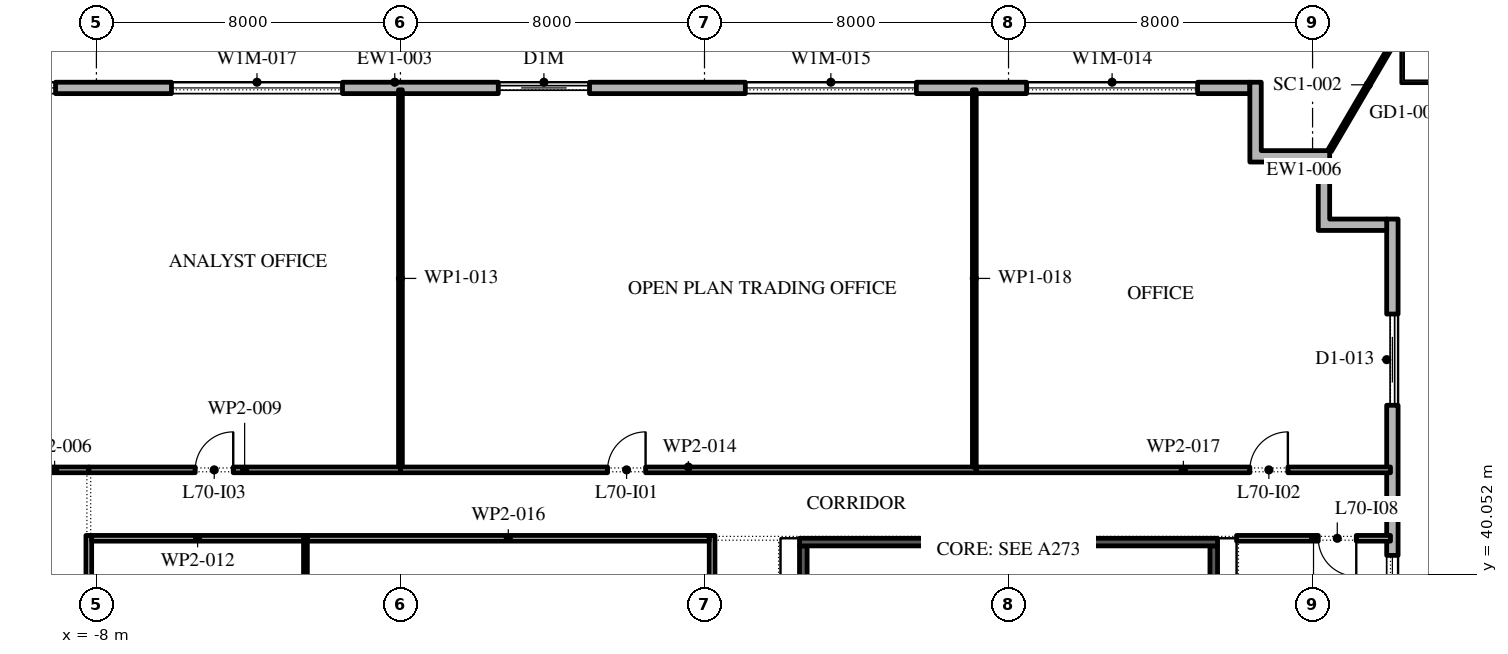
"""IFC4 building model, lengths in metres.
Left out: names, types, materials, properties, quantities, classifications, styles, units other than length and angle.
Written with IfcOpenShell. Run it as: python <this file> out.ifc"""

import sys

from ifc_helpers import new_model, si_unit, direction, frame, frame_2d, origin, place, context, subcontext, project, spatial, polyline, rectangle, outline, extrude, element, fill, save


model = new_model("IFC4")
c1 = context("Model", 3, precision=1e-05, world=origin(), true_north=direction((0.0, 1.0)))
c2 = subcontext(c1, "Body", "Model", "MODEL_VIEW")
j1 = project(units=[si_unit("LENGTHUNIT", "METRE"), si_unit("PLANEANGLEUNIT", "RADIAN")], contexts=[c1])
p1 = place(None, origin())
s1 = spatial("IfcSite", under=j1, at=p1, CompositionType="ELEMENT")
p2 = place(p1, origin())
s2 = spatial("IfcBuilding", under=s1, at=p2, CompositionType="ELEMENT")
p3 = place(p2, frame((0.0, 0.0, 321.6)))
s3 = spatial("IfcBuildingStorey", under=s2, at=p3, CompositionType="ELEMENT", Elevation=321.6)
p4 = place(p3, frame((26.1, -2.1, 0.0), z_axis=(0.0, 0.0, 1.0), x_axis=(0.0, 1.0, 0.0)))
e1 = element("IfcWall", 1, at=p4, inside=s3, PredefinedType="STANDARD", context=c2, shape_type="SweptSolid", body=[
    extrude(rectangle(XDim=51.5, YDim=0.3, at=frame_2d((25.75, 0.0))), origin(), (0.0, 0.0, 1.0), 4.0),
])
p5 = place(p4, frame((1.3, 0.0, 0.45)))
e2 = element("IfcOpeningElement", 2, at=p5, cuts=e1, PredefinedType="OPENING", context=c2, shape_type="SweptSolid", body=[
    extrude(rectangle(XDim=4.5, YDim=3.05, at=frame_2d((2.25, 1.525))), frame((0.0, 0.16, 0.0), z_axis=(0.0, -1.0, 0.0), x_axis=(1.0, 0.0, 0.0)), (0.0, 0.0, 1.0), 0.32),
])
p6 = place(p4, frame((8.55, 0.0, 0.45)))
e3 = element("IfcOpeningElement", 3, at=p6, cuts=e1, PredefinedType="OPENING", context=c2, shape_type="SweptSolid", body=[
    extrude(rectangle(XDim=4.5, YDim=3.05, at=frame_2d((2.25, 1.525))), frame((0.0, 0.16, 0.0), z_axis=(0.0, -1.0, 0.0), x_axis=(1.0, 0.0, 0.0)), (0.0, 0.0, 1.0), 0.32),
])
p7 = place(p4, frame((17.0, 0.0, 0.0)))
e4 = element("IfcOpeningElement", 4, at=p7, cuts=e1, PredefinedType="OPENING", context=c2, shape_type="SweptSolid", body=[
    extrude(rectangle(XDim=2.4, YDim=3.5, at=frame_2d((1.2, 1.75))), frame((0.0, 0.16, 0.0), z_axis=(0.0, -1.0, 0.0), x_axis=(1.0, 0.0, 0.0)), (0.0, 0.0, 1.0), 0.32),
])
p8 = place(p4, frame((23.35, 0.0, 0.45)))
e5 = element("IfcOpeningElement", 5, at=p8, cuts=e1, PredefinedType="OPENING", context=c2, shape_type="SweptSolid", body=[
    extrude(rectangle(XDim=4.5, YDim=3.05, at=frame_2d((2.25, 1.525))), frame((0.0, 0.16, 0.0), z_axis=(0.0, -1.0, 0.0), x_axis=(1.0, 0.0, 0.0)), (0.0, 0.0, 1.0), 0.32),
])
p9 = place(p4, frame((30.75, 0.0, 0.45)))
e6 = element("IfcOpeningElement", 6, at=p9, cuts=e1, PredefinedType="OPENING", context=c2, shape_type="SweptSolid", body=[
    extrude(rectangle(XDim=4.5, YDim=3.05, at=frame_2d((2.25, 1.525))), frame((0.0, 0.16, 0.0), z_axis=(0.0, -1.0, 0.0), x_axis=(1.0, 0.0, 0.0)), (0.0, 0.0, 1.0), 0.32),
])
p10 = place(p4, frame((38.15, 0.0, 0.45)))
e7 = element("IfcOpeningElement", 7, at=p10, cuts=e1, PredefinedType="OPENING", context=c2, shape_type="SweptSolid", body=[
    extrude(rectangle(XDim=4.5, YDim=3.05, at=frame_2d((2.25, 1.525))), frame((0.0, 0.16, 0.0), z_axis=(0.0, -1.0, 0.0), x_axis=(1.0, 0.0, 0.0)), (0.0, 0.0, 1.0), 0.32),
])
p11 = place(p4, frame((46.6, 0.0, 0.0)))
e8 = element("IfcOpeningElement", 8, at=p11, cuts=e1, PredefinedType="OPENING", context=c2, shape_type="SweptSolid", body=[
    extrude(rectangle(XDim=2.4, YDim=3.5, at=frame_2d((1.2, 1.75))), frame((0.0, 0.16, 0.0), z_axis=(0.0, -1.0, 0.0), x_axis=(1.0, 0.0, 0.0)), (0.0, 0.0, 1.0), 0.32),
])
p12 = place(p3, frame((22.35, 52.85, 0.0), z_axis=(0.0, 0.0, 1.0), x_axis=(-1.0, 0.0, 0.0)))
e9 = element("IfcWall", 9, at=p12, inside=s3, PredefinedType="STANDARD", context=c2, shape_type="SweptSolid", body=[
    extrude(rectangle(XDim=45.0, YDim=0.3, at=frame_2d((22.5, 0.0))), origin(), (0.0, 0.0, 1.0), 4.0),
])
p13 = place(p12, frame((1.375, 0.0, 0.45)))
e10 = element("IfcOpeningElement", 10, at=p13, cuts=e9, PredefinedType="OPENING", context=c2, shape_type="SweptSolid", body=[
    extrude(rectangle(XDim=4.5, YDim=2.575, at=frame_2d((2.25, 1.288))), frame((0.0, 0.16, 0.0), z_axis=(0.0, -1.0, 0.0), x_axis=(1.0, 0.0, 0.0)), (0.0, 0.0, 1.0), 0.32),
])
p14 = place(p12, frame((8.775, 0.0, 0.45)))
e11 = element("IfcOpeningElement", 11, at=p14, cuts=e9, PredefinedType="OPENING", context=c2, shape_type="SweptSolid", body=[
    extrude(rectangle(XDim=4.5, YDim=2.575, at=frame_2d((2.25, 1.288))), frame((0.0, 0.16, 0.0), z_axis=(0.0, -1.0, 0.0), x_axis=(1.0, 0.0, 0.0)), (0.0, 0.0, 1.0), 0.32),
])
p15 = place(p12, frame((17.375, 0.0, 0.0)))
e12 = element("IfcOpeningElement", 12, at=p15, cuts=e9, PredefinedType="OPENING", context=c2, shape_type="SweptSolid", body=[
    extrude(rectangle(XDim=2.4, YDim=3.025, at=frame_2d((1.2, 1.512))), frame((0.0, 0.16, 0.0), z_axis=(0.0, -1.0, 0.0), x_axis=(1.0, 0.0, 0.0)), (0.0, 0.0, 1.0), 0.32),
])
p16 = place(p12, frame((23.875, 0.0, 0.45)))
e13 = element("IfcOpeningElement", 13, at=p16, cuts=e9, PredefinedType="OPENING", context=c2, shape_type="SweptSolid", body=[
    extrude(rectangle(XDim=4.5, YDim=2.575, at=frame_2d((2.25, 1.288))), frame((0.0, 0.16, 0.0), z_axis=(0.0, -1.0, 0.0), x_axis=(1.0, 0.0, 0.0)), (0.0, 0.0, 1.0), 0.32),
])
p17 = place(p12, frame((31.425, 0.0, 0.45)))
e14 = element("IfcOpeningElement", 14, at=p17, cuts=e9, PredefinedType="OPENING", context=c2, shape_type="SweptSolid", body=[
    extrude(rectangle(XDim=4.5, YDim=2.575, at=frame_2d((2.25, 1.288))), frame((0.0, 0.16, 0.0), z_axis=(0.0, -1.0, 0.0), x_axis=(1.0, 0.0, 0.0)), (0.0, 0.0, 1.0), 0.32),
])
p18 = place(p12, frame((38.975, 0.0, 0.45)))
e15 = element("IfcOpeningElement", 15, at=p18, cuts=e9, PredefinedType="OPENING", context=c2, shape_type="SweptSolid", body=[
    extrude(rectangle(XDim=4.5, YDim=2.575, at=frame_2d((2.25, 1.288))), frame((0.0, 0.16, 0.0), z_axis=(0.0, -1.0, 0.0), x_axis=(1.0, 0.0, 0.0)), (0.0, 0.0, 1.0), 0.32),
])
p19 = place(p3, origin())
e16 = element("IfcWall", 16, at=p19, inside=s3, PredefinedType="STANDARD", context=c2, shape_type="SweptSolid", body=[
    extrude(outline(polyline([(24.15, 50.9), (22.35, 50.9), (22.35, 53.0), (22.65, 53.0), (22.65, 51.2), (24.45, 51.2), (24.45, 49.4), (25.95, 49.4), (25.95, 49.1), (24.15, 49.1), (24.15, 50.9)])), origin(), (0.0, 0.0, 1.0), 4.0),
])
p20 = place(p3, frame((24.45, 51.2, -0.05), z_axis=(0.0, 0.0, 1.0), x_axis=(0.506031495682, 0.862515000089, 0.0)))
e17 = element("IfcWall", 17, at=p20, inside=s3, PredefinedType="STANDARD", context=c2, shape_type="SweptSolid", body=[
    extrude(rectangle(XDim=4.016, YDim=0.1, at=frame_2d((2.008, 0.0))), origin(), (0.0, 0.0, 1.0), 4.05),
])
p21 = place(p3, frame((21.4, 25.75, 0.0), z_axis=(0.0, 0.0, 1.0), x_axis=(0.0, 1.0, 0.0)))
e18 = element("IfcWall", 18, at=p21, inside=s3, PredefinedType="SHEAR", context=c2, shape_type="SweptSolid", body=[
    extrude(rectangle(XDim=15.05, YDim=0.2, at=frame_2d((7.525, 0.0))), origin(), (0.0, 0.0, 1.0), 4.0),
])
p22 = place(p3, frame((10.6, 25.75, 0.0), z_axis=(0.0, 0.0, 1.0), x_axis=(0.0, 1.0, 0.0)))
e19 = element("IfcWall", 19, at=p22, inside=s3, PredefinedType="SHEAR", context=c2, shape_type="SweptSolid", body=[
    extrude(rectangle(XDim=15.05, YDim=0.2, at=frame_2d((7.525, 0.0))), origin(), (0.0, 0.0, 1.0), 4.0),
])
p23 = place(p22, frame((7.075, 0.0, 0.0)))
e20 = element("IfcOpeningElement", 20, at=p23, cuts=e19, PredefinedType="OPENING", context=c2, shape_type="SweptSolid", body=[
    extrude(rectangle(XDim=0.9, YDim=2.1, at=frame_2d((0.45, 1.05))), frame((0.0, 0.11, 0.0), z_axis=(0.0, -1.0, 0.0), x_axis=(1.0, 0.0, 0.0)), (0.0, 0.0, 1.0), 0.22),
])
p24 = place(p3, frame((10.5, 40.9, 0.0), z_axis=(0.0, 0.0, 1.0), x_axis=(1.0, 0.0, 0.0)))
e21 = element("IfcWall", 21, at=p24, inside=s3, PredefinedType="SHEAR", context=c2, shape_type="SweptSolid", body=[
    extrude(rectangle(XDim=11.0, YDim=0.2, at=frame_2d((5.5, 0.0))), origin(), (0.0, 0.0, 1.0), 4.0),
])
p25 = place(p3, frame((-10.0, 42.8, 0.0), z_axis=(0.0, 0.0, 1.0), x_axis=(1.0, 0.0, 0.0)))
e22 = element("IfcWall", 22, at=p25, inside=s3, PredefinedType="PARTITIONING", context=c2, shape_type="SweptSolid", body=[
    extrude(rectangle(XDim=1.8, YDim=0.15, at=frame_2d((0.9, 0.0))), origin(), (0.0, 0.0, 1.0), 4.0),
])
p26 = place(p3, frame((-8.2, 41.075, 0.0), z_axis=(0.0, 0.0, 1.0), x_axis=(0.0, -1.0, 0.0)))
e23 = element("IfcWall", 23, at=p26, inside=s3, PredefinedType="PARTITIONING", context=c2, shape_type="SweptSolid", body=[
    extrude(rectangle(XDim=22.0, YDim=0.15, at=frame_2d((11.0, 0.0))), origin(), (0.0, 0.0, 1.0), 4.0),
])
p27 = place(p26, frame((10.675, 0.0, 0.0)))
e24 = element("IfcOpeningElement", 24, at=p27, cuts=e23, PredefinedType="OPENING", context=c2, shape_type="SweptSolid", body=[
    extrude(rectangle(XDim=1.0, YDim=2.1, at=frame_2d((0.5, 1.05))), frame((0.0, 0.085, 0.0), z_axis=(0.0, -1.0, 0.0), x_axis=(1.0, 0.0, 0.0)), (0.0, 0.0, 1.0), 0.17),
])
p28 = place(p3, frame((-8.2, 42.8, 0.0), z_axis=(0.0, 0.0, 1.0), x_axis=(1.0, 0.0, 0.0)))
e25 = element("IfcWall", 25, at=p28, inside=s3, PredefinedType="PARTITIONING", context=c2, shape_type="SweptSolid", body=[
    extrude(rectangle(XDim=8.2, YDim=0.15, at=frame_2d((4.1, 0.0))), origin(), (0.0, 0.0, 1.0), 4.0),
])
p29 = place(p28, frame((2.8, 0.0, 0.0)))
e26 = element("IfcOpeningElement", 26, at=p29, cuts=e25, PredefinedType="OPENING", context=c2, shape_type="SweptSolid", body=[
    extrude(rectangle(XDim=1.0, YDim=2.1, at=frame_2d((0.5, 1.05))), frame((0.0, 0.085, 0.0), z_axis=(0.0, -1.0, 0.0), x_axis=(1.0, 0.0, 0.0)), (0.0, 0.0, 1.0), 0.17),
])
p30 = place(p3, frame((-2.5, 19.075, 0.0), z_axis=(0.0, 0.0, 1.0), x_axis=(0.0, 1.0, 0.0)))
e27 = element("IfcWall", 27, at=p30, inside=s3, PredefinedType="PARTITIONING", context=c2, shape_type="SweptSolid", body=[
    extrude(rectangle(XDim=22.0, YDim=0.1, at=frame_2d((11.0, 0.0))), origin(), (0.0, 0.0, 1.0), 4.0),
])
p31 = place(p3, frame((-2.55, 41.0, 0.0), z_axis=(0.0, 0.0, 1.0), x_axis=(-1.0, 0.0, 0.0)))
e28 = element("IfcWall", 28, at=p31, inside=s3, PredefinedType="PARTITIONING", context=c2, shape_type="SweptSolid", body=[
    extrude(rectangle(XDim=5.575, YDim=0.15, at=frame_2d((2.788, 0.0))), origin(), (0.0, 0.0, 1.0), 4.0),
])
p32 = place(p3, frame((0.0, 42.875, 0.0), z_axis=(0.0, 0.0, 1.0), x_axis=(0.0, 1.0, 0.0)))
e29 = element("IfcWall", 29, at=p32, inside=s3, PredefinedType="PARTITIONING", context=c2, shape_type="SweptSolid", body=[
    extrude(rectangle(XDim=9.925, YDim=0.1, at=frame_2d((4.962, 0.0))), origin(), (0.0, 0.0, 1.0), 4.0),
])
p33 = place(p3, frame((0.0, 42.8, 0.0), z_axis=(0.0, 0.0, 1.0), x_axis=(1.0, 0.0, 0.0)))
e30 = element("IfcWall", 30, at=p33, inside=s3, PredefinedType="PARTITIONING", context=c2, shape_type="SweptSolid", body=[
    extrude(rectangle(XDim=15.15, YDim=0.15, at=frame_2d((7.575, 0.0))), origin(), (0.0, 0.0, 1.0), 4.0),
])
p34 = place(p33, frame((5.45, 0.0, 0.0)))
e31 = element("IfcOpeningElement", 31, at=p34, cuts=e30, PredefinedType="OPENING", context=c2, shape_type="SweptSolid", body=[
    extrude(rectangle(XDim=1.0, YDim=2.1, at=frame_2d((0.5, 1.05))), frame((0.0, 0.085, 0.0), z_axis=(0.0, -1.0, 0.0), x_axis=(1.0, 0.0, 0.0)), (0.0, 0.0, 1.0), 0.17),
])
p35 = place(p3, frame((8.2, 19.075, 0.0), z_axis=(0.0, 0.0, 1.0), x_axis=(0.0, 1.0, 0.0)))
e32 = element("IfcWall", 32, at=p35, inside=s3, PredefinedType="PARTITIONING", context=c2, shape_type="SweptSolid", body=[
    extrude(rectangle(XDim=22.0, YDim=0.15, at=frame_2d((11.0, 0.0))), origin(), (0.0, 0.0, 1.0), 4.0),
])
p36 = place(p35, frame((7.725, 0.0, 0.0)))
e33 = element("IfcOpeningElement", 33, at=p36, cuts=e32, PredefinedType="OPENING", context=c2, shape_type="SweptSolid", body=[
    extrude(rectangle(XDim=1.8, YDim=2.1, at=frame_2d((0.9, 1.05))), frame((0.0, 0.085, 0.0), z_axis=(0.0, -1.0, 0.0), x_axis=(1.0, 0.0, 0.0)), (0.0, 0.0, 1.0), 0.17),
])
p37 = place(p3, frame((8.125, 41.0, 0.0), z_axis=(0.0, 0.0, 1.0), x_axis=(-1.0, 0.0, 0.0)))
e34 = element("IfcWall", 34, at=p37, inside=s3, PredefinedType="PARTITIONING", context=c2, shape_type="SweptSolid", body=[
    extrude(rectangle(XDim=10.575, YDim=0.15, at=frame_2d((5.288, 0.0))), origin(), (0.0, 0.0, 1.0), 4.0),
])
p38 = place(p3, frame((15.15, 42.8, 0.0), z_axis=(0.0, 0.0, 1.0), x_axis=(1.0, 0.0, 0.0)))
e35 = element("IfcWall", 35, at=p38, inside=s3, PredefinedType="PARTITIONING", context=c2, shape_type="SweptSolid", body=[
    extrude(rectangle(XDim=10.9, YDim=0.15, at=frame_2d((5.45, 0.0))), origin(), (0.0, 0.0, 1.0), 4.0),
])
p39 = place(p38, frame((7.2, 0.0, 0.0)))
e36 = element("IfcOpeningElement", 36, at=p39, cuts=e35, PredefinedType="OPENING", context=c2, shape_type="SweptSolid", body=[
    extrude(rectangle(XDim=1.0, YDim=2.1, at=frame_2d((0.5, 1.05))), frame((0.0, 0.085, 0.0), z_axis=(0.0, -1.0, 0.0), x_axis=(1.0, 0.0, 0.0)), (0.0, 0.0, 1.0), 0.17),
])
p40 = place(p3, frame((15.1, 52.8, 0.0), z_axis=(0.0, 0.0, 1.0), x_axis=(0.0, -1.0, 0.0)))
e37 = element("IfcWall", 37, at=p40, inside=s3, PredefinedType="PARTITIONING", context=c2, shape_type="SweptSolid", body=[
    extrude(rectangle(XDim=9.925, YDim=0.1, at=frame_2d((4.962, 0.0))), origin(), (0.0, 0.0, 1.0), 4.0),
])
p41 = place(p3, frame((26.05, 41.0, 0.0), z_axis=(0.0, 0.0, 1.0), x_axis=(-1.0, 0.0, 0.0)))
e38 = element("IfcWall", 38, at=p41, inside=s3, PredefinedType="PARTITIONING", context=c2, shape_type="SweptSolid", body=[
    extrude(rectangle(XDim=4.05, YDim=0.15, at=frame_2d((2.025, 0.0))), origin(), (0.0, 0.0, 1.0), 4.0),
])
p42 = place(p41, frame((0.9, 0.0, 0.0)))
e39 = element("IfcOpeningElement", 39, at=p42, cuts=e38, PredefinedType="OPENING", context=c2, shape_type="SweptSolid", body=[
    extrude(rectangle(XDim=1.0, YDim=2.1, at=frame_2d((0.5, 1.05))), frame((0.0, 0.085, 0.0), z_axis=(0.0, -1.0, 0.0), x_axis=(1.0, 0.0, 0.0)), (0.0, 0.0, 1.0), 0.17),
])
p43 = place(p10, origin())
e40 = element("IfcWindow", 40, at=p43, inside=s3, PartitioningType="DOUBLE_PANEL_VERTICAL", PredefinedType="WINDOW", context=c2, shape_type="SweptSolid", body=[
    extrude(rectangle(XDim=4.5, YDim=3.05, at=frame_2d((2.25, 1.525))), frame((0.0, 0.03, 0.0), z_axis=(0.0, -1.0, 0.0), x_axis=(1.0, 0.0, 0.0)), (0.0, 0.0, 1.0), 0.06),
])
fill(e7, e40)
p44 = place(p11, origin())
e41 = element("IfcDoor", 41, at=p44, inside=s3, OperationType="DOUBLE_DOOR_SLIDING", PredefinedType="DOOR", context=c2, shape_type="SweptSolid", body=[
    extrude(rectangle(XDim=2.4, YDim=3.5, at=frame_2d((1.2, 1.75))), frame((0.0, 0.025, 0.0), z_axis=(0.0, -1.0, 0.0), x_axis=(1.0, 0.0, 0.0)), (0.0, 0.0, 1.0), 0.05),
])
fill(e8, e41)
p45 = place(p13, origin())
e42 = element("IfcWindow", 42, at=p45, inside=s3, PartitioningType="DOUBLE_PANEL_VERTICAL", PredefinedType="WINDOW", context=c2, shape_type="SweptSolid", body=[
    extrude(rectangle(XDim=4.5, YDim=2.575, at=frame_2d((2.25, 1.288))), frame((0.0, 0.03, 0.0), z_axis=(0.0, -1.0, 0.0), x_axis=(1.0, 0.0, 0.0)), (0.0, 0.0, 1.0), 0.06),
])
fill(e10, e42)
p46 = place(p14, origin())
e43 = element("IfcWindow", 43, at=p46, inside=s3, PartitioningType="DOUBLE_PANEL_VERTICAL", PredefinedType="WINDOW", context=c2, shape_type="SweptSolid", body=[
    extrude(rectangle(XDim=4.5, YDim=2.575, at=frame_2d((2.25, 1.288))), frame((0.0, 0.03, 0.0), z_axis=(0.0, -1.0, 0.0), x_axis=(1.0, 0.0, 0.0)), (0.0, 0.0, 1.0), 0.06),
])
fill(e11, e43)
p47 = place(p15, origin())
e44 = element("IfcDoor", 44, at=p47, inside=s3, OperationType="DOUBLE_DOOR_SLIDING", PredefinedType="DOOR", context=c2, shape_type="SweptSolid", body=[
    extrude(rectangle(XDim=2.4, YDim=3.025, at=frame_2d((1.2, 1.512))), frame((0.0, 0.025, 0.0), z_axis=(0.0, -1.0, 0.0), x_axis=(1.0, 0.0, 0.0)), (0.0, 0.0, 1.0), 0.05),
])
fill(e12, e44)
p48 = place(p16, origin())
e45 = element("IfcWindow", 45, at=p48, inside=s3, PartitioningType="DOUBLE_PANEL_VERTICAL", PredefinedType="WINDOW", context=c2, shape_type="SweptSolid", body=[
    extrude(rectangle(XDim=4.5, YDim=2.575, at=frame_2d((2.25, 1.288))), frame((0.0, 0.03, 0.0), z_axis=(0.0, -1.0, 0.0), x_axis=(1.0, 0.0, 0.0)), (0.0, 0.0, 1.0), 0.06),
])
fill(e13, e45)
p49 = place(p17, origin())
e46 = element("IfcWindow", 46, at=p49, inside=s3, PartitioningType="DOUBLE_PANEL_VERTICAL", PredefinedType="WINDOW", context=c2, shape_type="SweptSolid", body=[
    extrude(rectangle(XDim=4.5, YDim=2.575, at=frame_2d((2.25, 1.288))), frame((0.0, 0.03, 0.0), z_axis=(0.0, -1.0, 0.0), x_axis=(1.0, 0.0, 0.0)), (0.0, 0.0, 1.0), 0.06),
])
fill(e14, e46)
p50 = place(p34, origin())
e47 = element("IfcDoor", 47, at=p50, inside=s3, OperationType="SINGLE_SWING_LEFT", PredefinedType="DOOR", context=c2, shape_type="SweptSolid", body=[
    extrude(rectangle(XDim=1.0, YDim=2.1, at=frame_2d((0.5, 1.05))), frame((0.0, 0.025, 0.0), z_axis=(0.0, -1.0, 0.0), x_axis=(1.0, 0.0, 0.0)), (0.0, 0.0, 1.0), 0.05),
])
fill(e31, e47)
p51 = place(p39, origin())
e48 = element("IfcDoor", 48, at=p51, inside=s3, OperationType="SINGLE_SWING_LEFT", PredefinedType="DOOR", context=c2, shape_type="SweptSolid", body=[
    extrude(rectangle(XDim=1.0, YDim=2.1, at=frame_2d((0.5, 1.05))), frame((0.0, 0.025, 0.0), z_axis=(0.0, -1.0, 0.0), x_axis=(1.0, 0.0, 0.0)), (0.0, 0.0, 1.0), 0.05),
])
fill(e36, e48)
p52 = place(p29, origin())
e49 = element("IfcDoor", 49, at=p52, inside=s3, OperationType="SINGLE_SWING_LEFT", PredefinedType="DOOR", context=c2, shape_type="SweptSolid", body=[
    extrude(rectangle(XDim=1.0, YDim=2.1, at=frame_2d((0.5, 1.05))), frame((0.0, 0.025, 0.0), z_axis=(0.0, -1.0, 0.0), x_axis=(1.0, 0.0, 0.0)), (0.0, 0.0, 1.0), 0.05),
])
fill(e26, e49)
p53 = place(p42, origin())
e50 = element("IfcDoor", 50, at=p53, inside=s3, OperationType="SINGLE_SWING_RIGHT", PredefinedType="DOOR", context=c2, shape_type="SweptSolid", body=[
    extrude(rectangle(XDim=1.0, YDim=2.1, at=frame_2d((0.5, 1.05))), frame((0.0, 0.025, 0.0), z_axis=(0.0, -1.0, 0.0), x_axis=(1.0, 0.0, 0.0)), (0.0, 0.0, 1.0), 0.05),
])
fill(e39, e50)
save(model, sys.argv[1])
